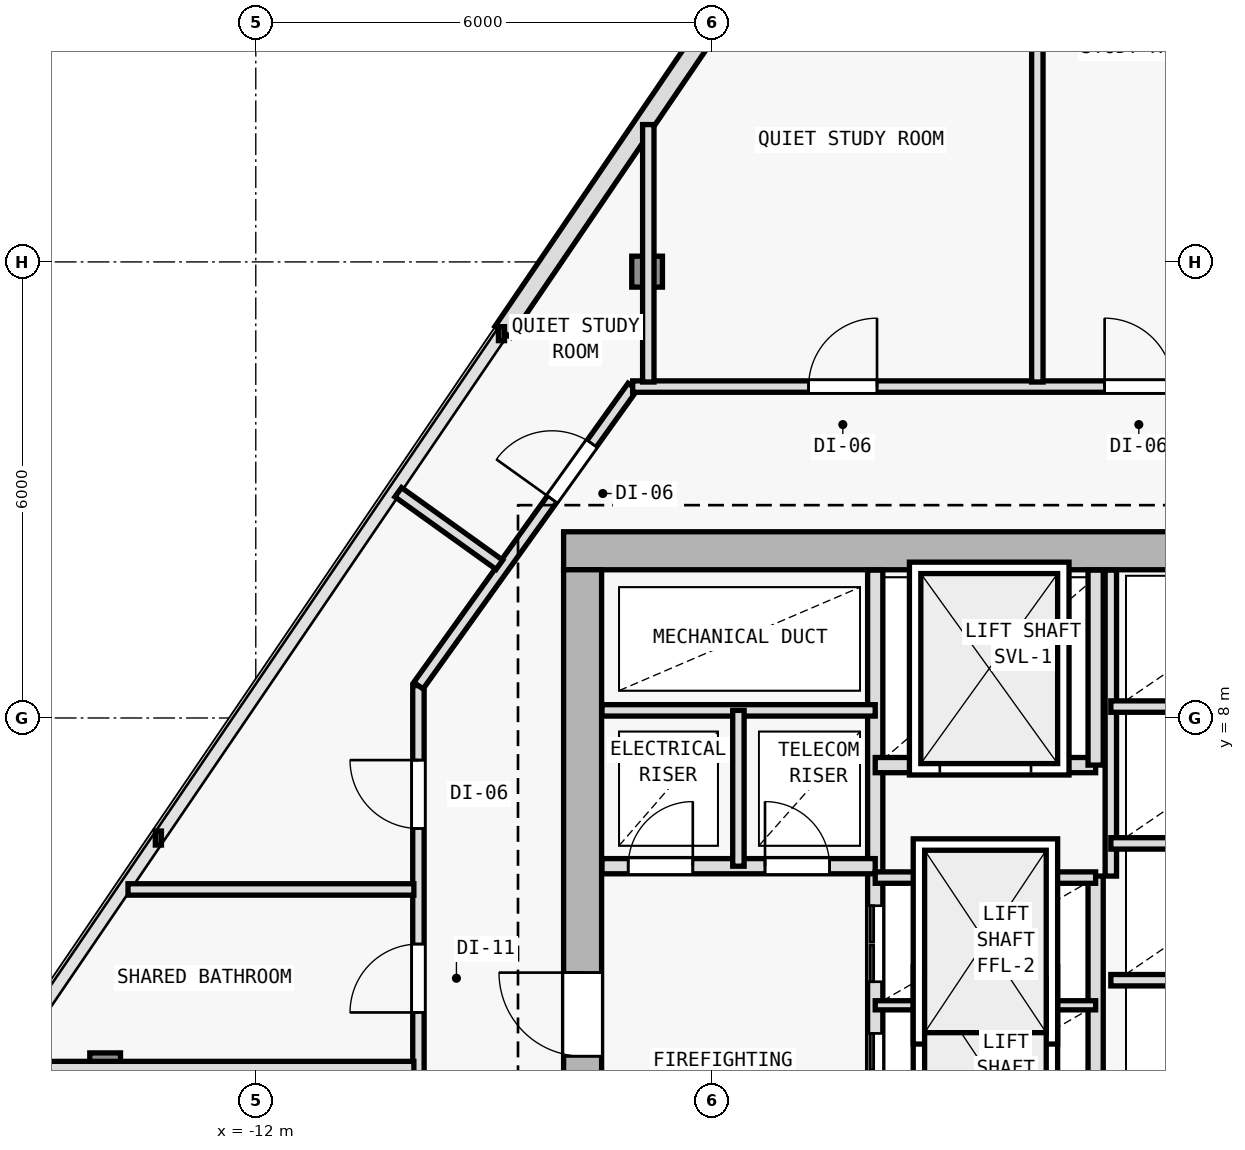
"""IFC4 building model, lengths in metres.
Left out: names, types, materials, properties, quantities, classifications, styles, units other than length and angle.
Written with IfcOpenShell. Run it as: python <this file> out.ifc"""

import sys

from ifc_helpers import new_model, si_unit, direction, frame, frame_2d, origin, origin_2d, place, context, subcontext, project, spatial, rectangle, i_section, extrude, element, fill, save


model = new_model("IFC4")
c1 = context("Model", 3, precision=1e-05, world=origin(), true_north=direction((0.0, 1.0)))
c2 = subcontext(c1, "Body", "Model", "MODEL_VIEW")
j1 = project(units=[si_unit("LENGTHUNIT", "METRE"), si_unit("PLANEANGLEUNIT", "RADIAN")], contexts=[c1])
p1 = place(None, origin())
s1 = spatial("IfcSite", under=j1, at=p1, CompositionType="ELEMENT")
p2 = place(p1, origin())
s2 = spatial("IfcBuilding", under=s1, at=p2, CompositionType="ELEMENT")
p3 = place(p2, frame((0.0, 0.0, 160.2)))
s3 = spatial("IfcBuildingStorey", under=s2, at=p3, CompositionType="ELEMENT", Elevation=160.2)
p4 = place(p3, frame((-7.7, 10.2, 0.0), z_axis=(0.0, 0.0, 1.0), x_axis=(1.0, 0.0, 0.0)))
e1 = element("IfcColumn", 1, at=p4, inside=s3, PredefinedType="COLUMN", context=c2, shape_type="SweptSolid", body=[
    extrude(i_section(OverallWidth=0.404, OverallDepth=0.407, WebThickness=0.017, FlangeThickness=0.028, FilletRadius=0.015, at=origin_2d()), origin(), (0.0, 0.0, 1.0), 3.6),
])
p5 = place(p3, frame((-6.851, 13.872, 0.006), z_axis=(0.008775143007, -0.002584925847, 0.999958156636), x_axis=(0.282568886397, 0.959247009086, 0.0)))
e2 = element("IfcColumn", 2, at=p5, inside=s3, PredefinedType="COLUMN", context=c2, shape_type="SweptSolid", body=[
    extrude(i_section(OverallWidth=0.404, OverallDepth=0.407, WebThickness=0.017, FlangeThickness=0.028, FilletRadius=0.015, at=origin_2d()), origin(), (0.0, 0.0, 1.0), 3.589),
])
p6 = place(p3, frame((-13.982, 3.39, 0.006), z_axis=(0.017003561856, 0.009590008887, 0.99980943715), x_axis=(-0.491253415567, 0.871016694268, 0.0)))
e3 = element("IfcColumn", 3, at=p6, inside=s3, PredefinedType="COLUMN", context=c2, shape_type="SweptSolid", body=[
    extrude(i_section(OverallWidth=0.404, OverallDepth=0.407, WebThickness=0.017, FlangeThickness=0.028, FilletRadius=0.015, at=origin_2d()), origin(), (0.0, 0.0, 1.0), 3.59),
])
p7 = place(p3, frame((-8.75, 13.081, 0.0), z_axis=(0.0, 0.0, 1.0), x_axis=(0.562463958751, 0.82682180372, 0.0)))
e4 = element("IfcWall", 4, at=p7, inside=s3, PredefinedType="SOLIDWALL", context=c2, shape_type="SweptSolid", body=[
    extrude(rectangle(XDim=11.322, YDim=0.25, at=frame_2d((5.661, 0.0))), origin(), (0.0, 0.0, 1.0), 3.35),
])
p8 = place(p7, frame((5.111, 0.0, 0.62)))
e5 = element("IfcOpeningElement", 5, at=p8, cuts=e4, PredefinedType="OPENING", context=c2, shape_type="SweptSolid", body=[
    extrude(rectangle(XDim=1.1, YDim=1.8, at=frame_2d((0.55, 0.9))), frame((0.0, 0.135, 0.0), z_axis=(0.0, -1.0, 0.0), x_axis=(1.0, 0.0, 0.0)), (0.0, 0.0, 1.0), 0.27),
])
p9 = place(p3, frame((7.95, 10.2, 0.0), z_axis=(0.0, 0.0, 1.0), x_axis=(-1.0, 0.0, 0.0)))
e6 = element("IfcWall", 6, at=p9, inside=s3, PredefinedType="SHEAR", context=c2, shape_type="SweptSolid", body=[
    extrude(rectangle(XDim=15.9, YDim=0.5, at=frame_2d((7.95, 0.0))), origin(), (0.0, 0.0, 1.0), 3.35),
])
p10 = place(p9, frame((4.4, 0.0, 0.0)))
e7 = element("IfcOpeningElement", 7, at=p10, cuts=e6, PredefinedType="OPENING", context=c2, shape_type="SweptSolid", body=[
    extrude(rectangle(XDim=1.1, YDim=2.15, at=frame_2d((0.55, 1.075))), frame((0.0, 0.26, 0.0), z_axis=(0.0, -1.0, 0.0), x_axis=(1.0, 0.0, 0.0)), (0.0, 0.0, 1.0), 0.52),
])
p11 = place(p3, frame((-7.7, -9.15, 0.0), z_axis=(0.0, 0.0, 1.0), x_axis=(0.0, 1.0, 0.0)))
e8 = element("IfcWall", 8, at=p11, inside=s3, PredefinedType="SHEAR", context=c2, shape_type="SweptSolid", body=[
    extrude(rectangle(XDim=19.1, YDim=0.5, at=frame_2d((9.55, 0.0))), origin(), (0.0, 0.0, 1.0), 3.35),
])
p12 = place(p11, frame((12.7, 0.0, 0.0)))
e9 = element("IfcOpeningElement", 9, at=p12, cuts=e8, PredefinedType="OPENING", context=c2, shape_type="SweptSolid", body=[
    extrude(rectangle(XDim=1.1, YDim=2.15, at=frame_2d((0.55, 1.075))), frame((0.0, 0.26, 0.0), z_axis=(0.0, -1.0, 0.0), x_axis=(1.0, 0.0, 0.0)), (0.0, 0.0, 1.0), 0.52),
])
p13 = place(p3, frame((-3.85, 1.35, 0.0), z_axis=(0.0, 0.0, 1.0), x_axis=(0.0, 1.0, 0.0)))
e10 = element("IfcWall", 10, at=p13, inside=s3, PredefinedType="SOLIDWALL", context=c2, shape_type="SweptSolid", body=[
    extrude(rectangle(XDim=8.595, YDim=0.2, at=frame_2d((4.297, 0.0))), origin(), (0.0, 0.0, 1.0), 3.35),
])
p14 = place(p13, frame((1.5, 0.0, 0.0)))
e11 = element("IfcOpeningElement", 11, at=p14, cuts=e10, PredefinedType="OPENING", context=c2, shape_type="SweptSolid", body=[
    extrude(rectangle(XDim=1.0, YDim=2.15, at=frame_2d((0.5, 1.075))), frame((0.0, 0.11, 0.0), z_axis=(0.0, -1.0, 0.0), x_axis=(1.0, 0.0, 0.0)), (0.0, 0.0, 1.0), 0.22),
])
p15 = place(p13, frame((3.18, 0.0, 0.0)))
e12 = element("IfcOpeningElement", 12, at=p15, cuts=e10, PredefinedType="OPENING", context=c2, shape_type="SweptSolid", body=[
    extrude(rectangle(XDim=1.0, YDim=2.15, at=frame_2d((0.5, 1.075))), frame((0.0, 0.11, 0.0), z_axis=(0.0, -1.0, 0.0), x_axis=(1.0, 0.0, 0.0)), (0.0, 0.0, 1.0), 0.22),
])
p16 = place(p3, frame((-7.445, 6.05, 0.0), z_axis=(0.0, 0.0, 1.0), x_axis=(1.0, 0.0, 0.0)))
e13 = element("IfcWall", 13, at=p16, inside=s3, PredefinedType="SOLIDWALL", context=c2, shape_type="SweptSolid", body=[
    extrude(rectangle(XDim=3.595, YDim=0.2, at=frame_2d((1.797, 0.0))), origin(), (0.0, 0.0, 1.0), 3.35),
])
p17 = place(p16, frame((0.345, 0.0, 0.0)))
e14 = element("IfcOpeningElement", 14, at=p17, cuts=e13, PredefinedType="OPENING", context=c2, shape_type="SweptSolid", body=[
    extrude(rectangle(XDim=0.85, YDim=2.1, at=frame_2d((0.425, 1.05))), frame((0.0, 0.11, 0.0), z_axis=(0.0, -1.0, 0.0), x_axis=(1.0, 0.0, 0.0)), (0.0, 0.0, 1.0), 0.22),
])
p18 = place(p16, frame((2.145, 0.0, 0.0)))
e15 = element("IfcOpeningElement", 15, at=p18, cuts=e13, PredefinedType="OPENING", context=c2, shape_type="SweptSolid", body=[
    extrude(rectangle(XDim=0.85, YDim=2.1, at=frame_2d((0.425, 1.05))), frame((0.0, 0.11, 0.0), z_axis=(0.0, -1.0, 0.0), x_axis=(1.0, 0.0, 0.0)), (0.0, 0.0, 1.0), 0.22),
])
p19 = place(p3, frame((-7.445, 8.1, 0.0), z_axis=(0.0, 0.0, 1.0), x_axis=(1.0, 0.0, 0.0)))
e16 = element("IfcWall", 16, at=p19, inside=s3, PredefinedType="PARTITIONING", context=c2, shape_type="SweptSolid", body=[
    extrude(rectangle(XDim=3.595, YDim=0.15, at=frame_2d((1.797, 0.0))), origin(), (0.0, 0.0, 1.0), 3.35),
])
p20 = place(p3, frame((-5.65, 6.05, 0.0), z_axis=(0.0, 0.0, 1.0), x_axis=(0.0, 1.0, 0.0)))
e17 = element("IfcWall", 17, at=p20, inside=s3, PredefinedType="PARTITIONING", context=c2, shape_type="SweptSolid", body=[
    extrude(rectangle(XDim=2.05, YDim=0.15, at=frame_2d((1.025, 0.0))), origin(), (0.0, 0.0, 1.0), 3.35),
])
p21 = place(p3, frame((-0.95, 2.65, 0.0), z_axis=(0.0, 0.0, 1.0), x_axis=(0.0, 1.0, 0.0)))
e18 = element("IfcWall", 18, at=p21, inside=s3, PredefinedType="SOLIDWALL", context=c2, shape_type="SweptSolid", body=[
    extrude(rectangle(XDim=3.27, YDim=0.2, at=frame_2d((1.635, 0.0))), origin(), (0.0, 0.0, 1.0), 3.35),
])
p22 = place(p3, frame((-3.85, 4.22, 0.0), z_axis=(0.0, 0.0, 1.0), x_axis=(1.0, 0.0, 0.0)))
e19 = element("IfcWall", 19, at=p22, inside=s3, PredefinedType="PARTITIONING", context=c2, shape_type="SweptSolid", body=[
    extrude(rectangle(XDim=2.9, YDim=0.12, at=frame_2d((1.45, 0.0))), origin(), (0.0, 0.0, 1.0), 3.35),
])
p23 = place(p3, frame((-3.85, 5.9, 0.0), z_axis=(0.0, 0.0, 1.0), x_axis=(1.0, 0.0, 0.0)))
e20 = element("IfcWall", 20, at=p23, inside=s3, PredefinedType="PARTITIONING", context=c2, shape_type="SweptSolid", body=[
    extrude(rectangle(XDim=2.9, YDim=0.15, at=frame_2d((1.45, 0.0))), origin(), (0.0, 0.0, 1.0), 3.35),
])
p24 = place(p3, frame((-3.85, 7.38, 0.0), z_axis=(0.0, 0.0, 1.0), x_axis=(1.0, 0.0, 0.0)))
e21 = element("IfcWall", 21, at=p24, inside=s3, PredefinedType="SOLIDWALL", context=c2, shape_type="SweptSolid", body=[
    extrude(rectangle(XDim=2.9, YDim=0.2, at=frame_2d((1.45, 0.0))), origin(), (0.0, 0.0, 1.0), 3.35),
])
p25 = place(p24, frame((0.85, 0.0, 0.0)))
e22 = element("IfcOpeningElement", 22, at=p25, cuts=e21, PredefinedType="OPENING", context=c2, shape_type="SweptSolid", body=[
    extrude(rectangle(XDim=1.2, YDim=2.2, at=frame_2d((0.6, 1.1))), frame((0.0, 0.11, 0.0), z_axis=(0.0, -1.0, 0.0), x_axis=(1.0, 0.0, 0.0)), (0.0, 0.0, 1.0), 0.22),
])
p26 = place(p3, frame((-0.95, 7.38, 0.0), z_axis=(0.0, 0.0, 1.0), x_axis=(0.0, 1.0, 0.0)))
e23 = element("IfcWall", 23, at=p26, inside=s3, PredefinedType="SOLIDWALL", context=c2, shape_type="SweptSolid", body=[
    extrude(rectangle(XDim=2.565, YDim=0.2, at=frame_2d((1.283, 0.0))), origin(), (0.0, 0.0, 1.0), 3.35),
])
p27 = place(p3, frame((-0.75, 5.92, 0.0), z_axis=(0.0, 0.0, 1.0), x_axis=(0.0, 1.0, 0.0)))
e24 = element("IfcWall", 24, at=p27, inside=s3, PredefinedType="PARTITIONING", context=c2, shape_type="SweptSolid", body=[
    extrude(rectangle(XDim=4.025, YDim=0.15, at=frame_2d((2.013, 0.0))), origin(), (0.0, 0.0, 1.0), 3.35),
])
for number, where, z_axis, x_axis in (
    (25, (-0.75, 4.55, 0.0), (0.0, 0.0, 1.0), (1.0, 0.0, 0.0)),
    (26, (-0.75, 6.35, 0.0), (0.0, 0.0, 1.0), (1.0, 0.0, 0.0)),
    (27, (-0.75, 8.15, 0.0), (0.0, 0.0, 1.0), (1.0, 0.0, 0.0)),
):
    element("IfcWall", number, at=place(p3, frame(where, z_axis=z_axis, x_axis=x_axis)), inside=s3, PredefinedType="PARTITIONING", context=c2, shape_type="SweptSolid", body=[
        extrude(rectangle(XDim=2.7, YDim=0.15, at=frame_2d((1.35, 0.0))), origin(), (0.0, 0.0, 1.0), 3.35),
    ])
p28 = place(p3, frame((-9.86, -11.56, 0.0), z_axis=(0.0, 0.0, 1.0), x_axis=(0.0, 1.0, 0.0)))
e28 = element("IfcWall", 28, at=p28, inside=s3, PredefinedType="PARTITIONING", context=c2, shape_type="SweptSolid", body=[
    extrude(rectangle(XDim=19.986, YDim=0.15, at=frame_2d((9.993, 0.0))), origin(), (0.0, 0.0, 1.0), 2.825),
])
p29 = place(p28, frame((10.667, 0.0, 0.0)))
e29 = element("IfcOpeningElement", 29, at=p29, cuts=e28, PredefinedType="OPENING", context=c2, shape_type="SweptSolid", body=[
    extrude(rectangle(XDim=0.9, YDim=2.1, at=frame_2d((0.45, 1.05))), frame((0.0, 0.085, 0.0), z_axis=(0.0, -1.0, 0.0), x_axis=(1.0, 0.0, 0.0)), (0.0, 0.0, 1.0), 0.17),
])
p30 = place(p28, frame((8.272, 0.0, 0.0)))
e30 = element("IfcOpeningElement", 30, at=p30, cuts=e28, PredefinedType="OPENING", context=c2, shape_type="SweptSolid", body=[
    extrude(rectangle(XDim=0.9, YDim=2.1, at=frame_2d((0.45, 1.05))), frame((0.0, 0.085, 0.0), z_axis=(0.0, -1.0, 0.0), x_axis=(1.0, 0.0, 0.0)), (0.0, 0.0, 1.0), 0.17),
])
p31 = place(p28, frame((5.54, 0.0, 0.0)))
e31 = element("IfcOpeningElement", 31, at=p31, cuts=e28, PredefinedType="OPENING", context=c2, shape_type="SweptSolid", body=[
    extrude(rectangle(XDim=0.9, YDim=2.1, at=frame_2d((0.45, 1.05))), frame((0.0, 0.085, 0.0), z_axis=(0.0, -1.0, 0.0), x_axis=(1.0, 0.0, 0.0)), (0.0, 0.0, 1.0), 0.17),
])
p32 = place(p28, frame((1.893, 0.0, 0.0)))
e32 = element("IfcOpeningElement", 32, at=p32, cuts=e28, PredefinedType="OPENING", context=c2, shape_type="SweptSolid", body=[
    extrude(rectangle(XDim=0.9, YDim=2.1, at=frame_2d((0.45, 1.05))), frame((0.0, 0.085, 0.0), z_axis=(0.0, -1.0, 0.0), x_axis=(1.0, 0.0, 0.0)), (0.0, 0.0, 1.0), 0.17),
])
p33 = place(p28, frame((18.106, 0.0, 0.0)))
e33 = element("IfcOpeningElement", 33, at=p33, cuts=e28, PredefinedType="OPENING", context=c2, shape_type="SweptSolid", body=[
    extrude(rectangle(XDim=0.9, YDim=2.1, at=frame_2d((0.45, 1.05))), frame((0.0, 0.085, 0.0), z_axis=(0.0, -1.0, 0.0), x_axis=(1.0, 0.0, 0.0)), (0.0, 0.0, 1.0), 0.17),
])
p34 = place(p28, frame((15.686, 0.0, 0.0)))
e34 = element("IfcOpeningElement", 34, at=p34, cuts=e28, PredefinedType="OPENING", context=c2, shape_type="SweptSolid", body=[
    extrude(rectangle(XDim=0.9, YDim=2.1, at=frame_2d((0.45, 1.05))), frame((0.0, 0.085, 0.0), z_axis=(0.0, -1.0, 0.0), x_axis=(1.0, 0.0, 0.0)), (0.0, 0.0, 1.0), 0.17),
])
p35 = place(p28, frame((13.165, 0.0, 0.0)))
e35 = element("IfcOpeningElement", 35, at=p35, cuts=e28, PredefinedType="OPENING", context=c2, shape_type="SweptSolid", body=[
    extrude(rectangle(XDim=0.9, YDim=2.1, at=frame_2d((0.45, 1.05))), frame((0.0, 0.085, 0.0), z_axis=(0.0, -1.0, 0.0), x_axis=(1.0, 0.0, 0.0)), (0.0, 0.0, 1.0), 0.17),
])
p36 = place(p3, frame((-9.86, 8.426, 0.0), z_axis=(0.0, 0.0, 1.0), x_axis=(0.582449511476, 0.812866881218, 0.0)))
e36 = element("IfcWall", 36, at=p36, inside=s3, PredefinedType="PARTITIONING", context=c2, shape_type="SweptSolid", body=[
    extrude(rectangle(XDim=4.84, YDim=0.15, at=frame_2d((2.42, 0.0))), origin(), (0.0, 0.0, 1.0), 2.965),
])
p37 = place(p36, frame((3.017, 0.0, 0.0)))
e37 = element("IfcOpeningElement", 37, at=p37, cuts=e36, PredefinedType="OPENING", context=c2, shape_type="SweptSolid", body=[
    extrude(rectangle(XDim=0.9, YDim=2.1, at=frame_2d((0.45, 1.05))), frame((0.0, 0.085, 0.0), z_axis=(0.0, -1.0, 0.0), x_axis=(1.0, 0.0, 0.0)), (0.0, 0.0, 1.0), 0.17),
])
p38 = place(p3, frame((-7.041, 12.36, 0.0), z_axis=(0.0, 0.0, 1.0), x_axis=(1.0, 0.0, 0.0)))
e38 = element("IfcWall", 38, at=p38, inside=s3, PredefinedType="PARTITIONING", context=c2, shape_type="SweptSolid", body=[
    extrude(rectangle(XDim=14.064, YDim=0.15, at=frame_2d((7.032, 0.0))), origin(), (0.0, 0.0, 1.0), 2.965),
])
p39 = place(p38, frame((12.163, 0.0, 0.0)))
e39 = element("IfcOpeningElement", 39, at=p39, cuts=e38, PredefinedType="OPENING", context=c2, shape_type="SweptSolid", body=[
    extrude(rectangle(XDim=0.9, YDim=2.1, at=frame_2d((0.45, 1.05))), frame((0.0, 0.085, 0.0), z_axis=(0.0, -1.0, 0.0), x_axis=(1.0, 0.0, 0.0)), (0.0, 0.0, 1.0), 0.17),
])
p40 = place(p38, frame((9.217, 0.0, 0.0)))
e40 = element("IfcOpeningElement", 40, at=p40, cuts=e38, PredefinedType="OPENING", context=c2, shape_type="SweptSolid", body=[
    extrude(rectangle(XDim=0.9, YDim=2.1, at=frame_2d((0.45, 1.05))), frame((0.0, 0.085, 0.0), z_axis=(0.0, -1.0, 0.0), x_axis=(1.0, 0.0, 0.0)), (0.0, 0.0, 1.0), 0.17),
])
p41 = place(p38, frame((6.209, 0.0, 0.0)))
e41 = element("IfcOpeningElement", 41, at=p41, cuts=e38, PredefinedType="OPENING", context=c2, shape_type="SweptSolid", body=[
    extrude(rectangle(XDim=0.9, YDim=2.1, at=frame_2d((0.45, 1.05))), frame((0.0, 0.085, 0.0), z_axis=(0.0, -1.0, 0.0), x_axis=(1.0, 0.0, 0.0)), (0.0, 0.0, 1.0), 0.17),
])
p42 = place(p38, frame((2.315, 0.0, 0.0)))
e42 = element("IfcOpeningElement", 42, at=p42, cuts=e38, PredefinedType="OPENING", context=c2, shape_type="SweptSolid", body=[
    extrude(rectangle(XDim=0.9, YDim=2.1, at=frame_2d((0.45, 1.05))), frame((0.0, 0.085, 0.0), z_axis=(0.0, -1.0, 0.0), x_axis=(1.0, 0.0, 0.0)), (0.0, 0.0, 1.0), 0.17),
])
p43 = place(p3, frame((-6.836, 12.42, 0.0), z_axis=(0.0, 0.0, 1.0), x_axis=(0.0, 1.0, 0.0)))
e43 = element("IfcWall", 43, at=p43, inside=s3, PredefinedType="PARTITIONING", context=c2, shape_type="SweptSolid", body=[
    extrude(rectangle(XDim=3.387, YDim=0.15, at=frame_2d((1.693, 0.0))), origin(), (0.0, 0.0, 1.0), 2.935),
])
p44 = place(p3, frame((-9.92, 3.407, 0.0), z_axis=(0.0, 0.0, 1.0), x_axis=(-1.0, 0.0, 0.0)))
e44 = element("IfcWall", 44, at=p44, inside=s3, PredefinedType="PARTITIONING", context=c2, shape_type="SweptSolid", body=[
    extrude(rectangle(XDim=5.351, YDim=0.15, at=frame_2d((2.675, 0.0))), origin(), (0.0, 0.0, 1.0), 2.935),
])
p45 = place(p3, frame((-8.794, 10.016, 0.0), z_axis=(0.0, 0.0, 1.0), x_axis=(-0.812917074644, 0.582379455125, 0.0)))
e45 = element("IfcWall", 45, at=p45, inside=s3, PredefinedType="PARTITIONING", context=c2, shape_type="SweptSolid", body=[
    extrude(rectangle(XDim=1.638, YDim=0.15, at=frame_2d((0.819, 0.0))), origin(), (0.0, 0.0, 1.0), 2.935),
])
p46 = place(p3, frame((-1.717, 12.42, 0.0), z_axis=(0.0, 0.0, 1.0), x_axis=(0.0, 1.0, 0.0)))
e46 = element("IfcWall", 46, at=p46, inside=s3, PredefinedType="PARTITIONING", context=c2, shape_type="SweptSolid", body=[
    extrude(rectangle(XDim=9.697, YDim=0.15, at=frame_2d((4.849, 0.0))), origin(), (0.0, 0.0, 1.0), 2.935),
])
p47 = place(p3, frame((-9.92, 5.744, 0.0), z_axis=(0.0, 0.0, 1.0), x_axis=(-1.0, 0.0, 0.0)))
e47 = element("IfcWall", 47, at=p47, inside=s3, PredefinedType="PARTITIONING", context=c2, shape_type="SweptSolid", body=[
    extrude(rectangle(XDim=3.761, YDim=0.15, at=frame_2d((1.88, 0.0))), origin(), (0.0, 0.0, 1.0), 2.935),
])
p48 = place(p12, origin())
e48 = element("IfcDoor", 48, at=p48, inside=s3, OperationType="SINGLE_SWING_RIGHT", PredefinedType="DOOR", context=c2, shape_type="SweptSolid", body=[
    extrude(rectangle(XDim=1.1, YDim=2.15, at=frame_2d((0.55, 1.075))), frame((0.0, 0.025, 0.0), z_axis=(0.0, -1.0, 0.0), x_axis=(1.0, 0.0, 0.0)), (0.0, 0.0, 1.0), 0.05),
])
fill(e9, e48)
p49 = place(p17, origin())
e49 = element("IfcDoor", 49, at=p49, inside=s3, OperationType="SINGLE_SWING_RIGHT", PredefinedType="DOOR", context=c2, shape_type="SweptSolid", body=[
    extrude(rectangle(XDim=0.85, YDim=2.1, at=frame_2d((0.425, 1.05))), frame((0.0, 0.025, 0.0), z_axis=(0.0, -1.0, 0.0), x_axis=(1.0, 0.0, 0.0)), (0.0, 0.0, 1.0), 0.05),
])
fill(e14, e49)
p50 = place(p18, origin())
e50 = element("IfcDoor", 50, at=p50, inside=s3, OperationType="SINGLE_SWING_LEFT", PredefinedType="DOOR", context=c2, shape_type="SweptSolid", body=[
    extrude(rectangle(XDim=0.85, YDim=2.1, at=frame_2d((0.425, 1.05))), frame((0.0, 0.025, 0.0), z_axis=(0.0, -1.0, 0.0), x_axis=(1.0, 0.0, 0.0)), (0.0, 0.0, 1.0), 0.05),
])
fill(e15, e50)
p51 = place(p25, origin())
e51 = element("IfcDoor", 51, at=p51, inside=s3, OperationType="DOUBLE_DOOR_SLIDING", PredefinedType="DOOR", context=c2, shape_type="SweptSolid", body=[
    extrude(rectangle(XDim=1.2, YDim=2.2, at=frame_2d((0.6, 1.1))), frame((0.0, 0.025, 0.0), z_axis=(0.0, -1.0, 0.0), x_axis=(1.0, 0.0, 0.0)), (0.0, 0.0, 1.0), 0.05),
])
fill(e22, e51)
p52 = place(p14, origin())
e52 = element("IfcDoor", 52, at=p52, inside=s3, OperationType="DOUBLE_DOOR_SLIDING", PredefinedType="DOOR", context=c2, shape_type="SweptSolid", body=[
    extrude(rectangle(XDim=1.0, YDim=2.15, at=frame_2d((0.5, 1.075))), frame((0.0, 0.025, 0.0), z_axis=(0.0, -1.0, 0.0), x_axis=(1.0, 0.0, 0.0)), (0.0, 0.0, 1.0), 0.05),
])
fill(e11, e52)
p53 = place(p15, origin())
e53 = element("IfcDoor", 53, at=p53, inside=s3, OperationType="DOUBLE_DOOR_SLIDING", PredefinedType="DOOR", context=c2, shape_type="SweptSolid", body=[
    extrude(rectangle(XDim=1.0, YDim=2.15, at=frame_2d((0.5, 1.075))), frame((0.0, 0.025, 0.0), z_axis=(0.0, -1.0, 0.0), x_axis=(1.0, 0.0, 0.0)), (0.0, 0.0, 1.0), 0.05),
])
fill(e12, e53)
p54 = place(p41, origin())
e54 = element("IfcDoor", 54, at=p54, inside=s3, OperationType="SINGLE_SWING_LEFT", PredefinedType="DOOR", context=c2, shape_type="SweptSolid", body=[
    extrude(rectangle(XDim=0.9, YDim=2.1, at=frame_2d((0.45, 1.05))), frame((0.0, 0.025, 0.0), z_axis=(0.0, -1.0, 0.0), x_axis=(1.0, 0.0, 0.0)), (0.0, 0.0, 1.0), 0.05),
])
fill(e41, e54)
p55 = place(p42, origin())
e55 = element("IfcDoor", 55, at=p55, inside=s3, OperationType="SINGLE_SWING_RIGHT", PredefinedType="DOOR", context=c2, shape_type="SweptSolid", body=[
    extrude(rectangle(XDim=0.9, YDim=2.1, at=frame_2d((0.45, 1.05))), frame((0.0, 0.025, 0.0), z_axis=(0.0, -1.0, 0.0), x_axis=(1.0, 0.0, 0.0)), (0.0, 0.0, 1.0), 0.05),
])
fill(e42, e55)
p56 = place(p37, origin())
e56 = element("IfcDoor", 56, at=p56, inside=s3, OperationType="SINGLE_SWING_LEFT", PredefinedType="DOOR", context=c2, shape_type="SweptSolid", body=[
    extrude(rectangle(XDim=0.9, YDim=2.1, at=frame_2d((0.45, 1.05))), frame((0.0, 0.025, 0.0), z_axis=(0.0, -1.0, 0.0), x_axis=(1.0, 0.0, 0.0)), (0.0, 0.0, 1.0), 0.05),
])
fill(e37, e56)
p57 = place(p33, origin())
e57 = element("IfcDoor", 57, at=p57, inside=s3, OperationType="SINGLE_SWING_RIGHT", PredefinedType="DOOR", context=c2, shape_type="SweptSolid", body=[
    extrude(rectangle(XDim=0.9, YDim=2.1, at=frame_2d((0.45, 1.05))), frame((0.0, 0.025, 0.0), z_axis=(0.0, -1.0, 0.0), x_axis=(1.0, 0.0, 0.0)), (0.0, 0.0, 1.0), 0.05),
])
fill(e33, e57)
p58 = place(p34, origin())
e58 = element("IfcDoor", 58, at=p58, inside=s3, OperationType="SINGLE_SWING_LEFT", PredefinedType="DOOR", context=c2, shape_type="SweptSolid", body=[
    extrude(rectangle(XDim=0.9, YDim=2.1, at=frame_2d((0.45, 1.05))), frame((0.0, 0.025, 0.0), z_axis=(0.0, -1.0, 0.0), x_axis=(1.0, 0.0, 0.0)), (0.0, 0.0, 1.0), 0.05),
])
fill(e34, e58)
save(model, sys.argv[1])
